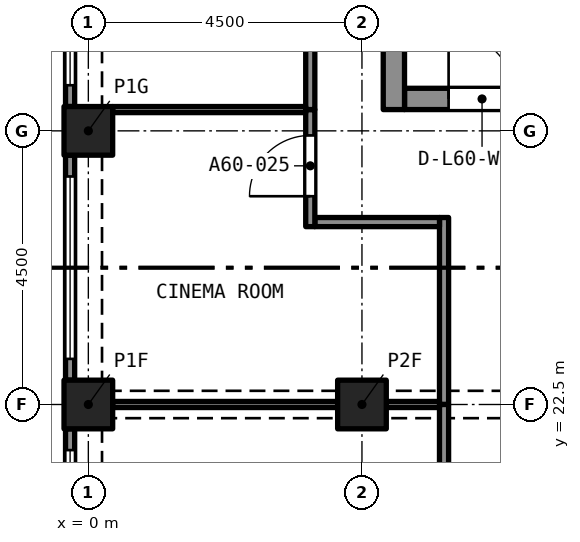
"""IFC4 building model, lengths in metres.
Left out: names, types, materials, properties, quantities, classifications, styles, units other than length and angle.
Written with IfcOpenShell. Run it as: python <this file> out.ifc"""

import sys

from ifc_helpers import new_model, si_unit, direction, frame, frame_2d, origin, origin_2d, place, context, subcontext, project, spatial, rectangle, extrude, element, fill, save


model = new_model("IFC4")
c1 = context("Model", 3, precision=1e-05, world=origin(), true_north=direction((0.0, 1.0)))
c2 = subcontext(c1, "Body", "Model", "MODEL_VIEW")
j1 = project(units=[si_unit("LENGTHUNIT", "METRE"), si_unit("PLANEANGLEUNIT", "RADIAN")], contexts=[c1])
p1 = place(None, origin())
s1 = spatial("IfcSite", under=j1, at=p1, CompositionType="ELEMENT")
p2 = place(p1, origin())
s2 = spatial("IfcBuilding", under=s1, at=p2, CompositionType="ELEMENT")
p3 = place(p2, frame((0.0, 0.0, 216.495)))
s3 = spatial("IfcBuildingStorey", under=s2, at=p3, CompositionType="ELEMENT", Elevation=216.495)
for number, where, z_axis, x_axis in (
    (1, (0.0, 22.5, 0.0), (0.0, 0.0, 1.0), (1.0, 0.0, 0.0)),
    (2, (4.5, 22.5, 0.0), (0.0, 0.0, 1.0), (1.0, 0.0, 0.0)),
    (3, (0.0, 27.0, 0.0), (0.0, 0.0, 1.0), (1.0, 0.0, 0.0)),
):
    element("IfcColumn", number, at=place(p3, frame(where, z_axis=z_axis, x_axis=x_axis)), inside=s3, PredefinedType="COLUMN", context=c2, shape_type="SweptSolid", body=[
        extrude(rectangle(XDim=0.8, YDim=0.8, at=origin_2d()), origin(), (0.0, 0.0, 1.0), 3.2),
    ])
p4 = place(p3, frame((5.2, 27.525, 0.0), z_axis=(0.0, 0.0, 1.0), x_axis=(1.0, 0.0, 0.0)))
e4 = element("IfcWall", 4, at=p4, inside=s3, PredefinedType="SOLIDWALL", context=c2, shape_type="SweptSolid", body=[
    extrude(rectangle(XDim=7.6, YDim=0.35, at=frame_2d((3.8, 0.0))), origin(), (0.0, 0.0, 1.0), 3.2),
])
p5 = place(p4, frame((0.725, 0.0, 0.0)))
e5 = element("IfcOpeningElement", 5, at=p5, cuts=e4, PredefinedType="OPENING", context=c2, shape_type="SweptSolid", body=[
    extrude(rectangle(XDim=1.1, YDim=2.1, at=frame_2d((0.55, 1.05))), frame((0.0, 0.185, 0.0), z_axis=(0.0, -1.0, 0.0), x_axis=(1.0, 0.0, 0.0)), (0.0, 0.0, 1.0), 0.37),
])
p6 = place(p4, frame((3.25, 0.0, 0.0)))
e6 = element("IfcOpeningElement", 6, at=p6, cuts=e4, PredefinedType="OPENING", context=c2, shape_type="SweptSolid", body=[
    extrude(rectangle(XDim=1.1, YDim=2.1, at=frame_2d((0.55, 1.05))), frame((0.0, 0.185, 0.0), z_axis=(0.0, -1.0, 0.0), x_axis=(1.0, 0.0, 0.0)), (0.0, 0.0, 1.0), 0.37),
])
p7 = place(p4, frame((5.775, 0.0, 0.0)))
e7 = element("IfcOpeningElement", 7, at=p7, cuts=e4, PredefinedType="OPENING", context=c2, shape_type="SweptSolid", body=[
    extrude(rectangle(XDim=1.1, YDim=2.1, at=frame_2d((0.55, 1.05))), frame((0.0, 0.185, 0.0), z_axis=(0.0, -1.0, 0.0), x_axis=(1.0, 0.0, 0.0)), (0.0, 0.0, 1.0), 0.37),
])
p8 = place(p3, frame((5.025, 27.35, 0.0), z_axis=(0.0, 0.0, 1.0), x_axis=(0.0, 1.0, 0.0)))
e8 = element("IfcWall", 8, at=p8, inside=s3, PredefinedType="SOLIDWALL", context=c2, shape_type="SweptSolid", body=[
    extrude(rectangle(XDim=12.8, YDim=0.35, at=frame_2d((6.4, 0.0))), origin(), (0.0, 0.0, 1.0), 3.2),
])
p9 = place(p8, frame((8.6, 0.0, 0.0)))
e9 = element("IfcOpeningElement", 9, at=p9, cuts=e8, PredefinedType="OPENING", context=c2, shape_type="SweptSolid", body=[
    extrude(rectangle(XDim=1.2, YDim=2.1, at=frame_2d((0.6, 1.05))), frame((0.0, 0.185, 0.0), z_axis=(0.0, -1.0, 0.0), x_axis=(1.0, 0.0, 0.0)), (0.0, 0.0, 1.0), 0.37),
])
p10 = place(p3, frame((-0.3, 27.4, 0.0), z_axis=(0.0, 0.0, 1.0), x_axis=(0.0, 1.0, 0.0)))
e10 = element("IfcWall", 10, at=p10, inside=s3, PredefinedType="SOLIDWALL", context=c2, shape_type="SweptSolid", body=[
    extrude(rectangle(XDim=3.7, YDim=0.15, at=frame_2d((1.85, 0.0))), origin(), (0.0, 0.0, 1.0), 3.2),
])
p11 = place(p10, frame((0.35, 0.0, 0.45)))
e11 = element("IfcOpeningElement", 11, at=p11, cuts=e10, PredefinedType="OPENING", context=c2, shape_type="SweptSolid", body=[
    extrude(rectangle(XDim=3.0, YDim=1.95, at=frame_2d((1.5, 0.975))), frame((0.0, 0.085, 0.0), z_axis=(0.0, -1.0, 0.0), x_axis=(1.0, 0.0, 0.0)), (0.0, 0.0, 1.0), 0.17),
])
p12 = place(p3, frame((-0.3, 22.9, 0.0), z_axis=(0.0, 0.0, 1.0), x_axis=(0.0, 1.0, 0.0)))
e12 = element("IfcWall", 12, at=p12, inside=s3, PredefinedType="SOLIDWALL", context=c2, shape_type="SweptSolid", body=[
    extrude(rectangle(XDim=3.7, YDim=0.15, at=frame_2d((1.85, 0.0))), origin(), (0.0, 0.0, 1.0), 3.2),
])
p13 = place(p12, frame((0.35, 0.0, 0.45)))
e13 = element("IfcOpeningElement", 13, at=p13, cuts=e12, PredefinedType="OPENING", context=c2, shape_type="SweptSolid", body=[
    extrude(rectangle(XDim=3.0, YDim=1.95, at=frame_2d((1.5, 0.975))), frame((0.0, 0.085, 0.0), z_axis=(0.0, -1.0, 0.0), x_axis=(1.0, 0.0, 0.0)), (0.0, 0.0, 1.0), 0.17),
])
p14 = place(p3, frame((-0.3, 18.4, 0.0), z_axis=(0.0, 0.0, 1.0), x_axis=(0.0, 1.0, 0.0)))
e14 = element("IfcWall", 14, at=p14, inside=s3, PredefinedType="SOLIDWALL", context=c2, shape_type="SweptSolid", body=[
    extrude(rectangle(XDim=3.7, YDim=0.15, at=frame_2d((1.85, 0.0))), origin(), (0.0, 0.0, 1.0), 3.2),
])
p15 = place(p14, frame((0.35, 0.0, 0.45)))
e15 = element("IfcOpeningElement", 15, at=p15, cuts=e14, PredefinedType="OPENING", context=c2, shape_type="SweptSolid", body=[
    extrude(rectangle(XDim=3.0, YDim=1.95, at=frame_2d((1.5, 0.975))), frame((0.0, 0.085, 0.0), z_axis=(0.0, -1.0, 0.0), x_axis=(1.0, 0.0, 0.0)), (0.0, 0.0, 1.0), 0.17),
])
p16 = place(p3, frame((5.85, 22.5, 0.0), z_axis=(0.0, 0.0, 1.0), x_axis=(0.0, 1.0, 0.0)))
e16 = element("IfcWall", 16, at=p16, inside=s3, PredefinedType="PARTITIONING", context=c2, shape_type="SweptSolid", body=[
    extrude(rectangle(XDim=3.075, YDim=0.15, at=frame_2d((1.538, 0.0))), origin(), (0.0, 0.0, 1.0), 2.9),
])
p17 = place(p3, frame((3.725, 25.5, 0.0), z_axis=(0.0, 0.0, 1.0), x_axis=(1.0, 0.0, 0.0)))
e17 = element("IfcWall", 17, at=p17, inside=s3, PredefinedType="PARTITIONING", context=c2, shape_type="SweptSolid", body=[
    extrude(rectangle(XDim=2.05, YDim=0.15, at=frame_2d((1.025, 0.0))), origin(), (0.0, 0.0, 1.0), 2.9),
])
p18 = place(p3, frame((3.65, 25.425, 0.0), z_axis=(0.0, 0.0, 1.0), x_axis=(0.0, 1.0, 0.0)))
e18 = element("IfcWall", 18, at=p18, inside=s3, PredefinedType="PARTITIONING", context=c2, shape_type="SweptSolid", body=[
    extrude(rectangle(XDim=1.925, YDim=0.15, at=frame_2d((0.962, 0.0))), origin(), (0.0, 0.0, 1.0), 2.9),
])
p19 = place(p18, frame((0.5, 0.0, 0.0)))
e19 = element("IfcOpeningElement", 19, at=p19, cuts=e18, PredefinedType="OPENING", context=c2, shape_type="SweptSolid", body=[
    extrude(rectangle(XDim=1.0, YDim=2.1, at=frame_2d((0.5, 1.05))), frame((0.0, 0.085, 0.0), z_axis=(0.0, -1.0, 0.0), x_axis=(1.0, 0.0, 0.0)), (0.0, 0.0, 1.0), 0.17),
])
p20 = place(p3, frame((3.65, 27.35, 0.0), z_axis=(0.0, 0.0, 1.0), x_axis=(0.0, 1.0, 0.0)))
e20 = element("IfcWall", 20, at=p20, inside=s3, PredefinedType="PARTITIONING", context=c2, shape_type="SweptSolid", body=[
    extrude(rectangle(XDim=4.15, YDim=0.15, at=frame_2d((2.075, 0.0))), origin(), (0.0, 0.0, 1.0), 2.9),
])
p21 = place(p20, frame((1.575, 0.0, 0.0)))
e21 = element("IfcOpeningElement", 21, at=p21, cuts=e20, PredefinedType="OPENING", context=c2, shape_type="SweptSolid", body=[
    extrude(rectangle(XDim=1.0, YDim=2.1, at=frame_2d((0.5, 1.05))), frame((0.0, 0.085, 0.0), z_axis=(0.0, -1.0, 0.0), x_axis=(1.0, 0.0, 0.0)), (0.0, 0.0, 1.0), 0.17),
])
p22 = place(p3, frame((5.85, 13.025, 0.0), z_axis=(0.0, 0.0, 1.0), x_axis=(0.0, 1.0, 0.0)))
e22 = element("IfcWall", 22, at=p22, inside=s3, PredefinedType="PARTITIONING", context=c2, shape_type="SweptSolid", body=[
    extrude(rectangle(XDim=9.475, YDim=0.15, at=frame_2d((4.738, 0.0))), origin(), (0.0, 0.0, 1.0), 2.9),
])
p23 = place(p22, frame((4.275, 0.0, 0.0)))
e23 = element("IfcOpeningElement", 23, at=p23, cuts=e22, PredefinedType="OPENING", context=c2, shape_type="SweptSolid", body=[
    extrude(rectangle(XDim=1.0, YDim=2.1, at=frame_2d((0.5, 1.05))), frame((0.0, 0.085, 0.0), z_axis=(0.0, -1.0, 0.0), x_axis=(1.0, 0.0, 0.0)), (0.0, 0.0, 1.0), 0.17),
])
p24 = place(p3, frame((0.4, 27.35, 0.0), z_axis=(0.0, 0.0, 1.0), x_axis=(1.0, 0.0, 0.0)))
e24 = element("IfcWall", 24, at=p24, inside=s3, PredefinedType="PARTITIONING", context=c2, shape_type="SweptSolid", body=[
    extrude(rectangle(XDim=3.175, YDim=0.1, at=frame_2d((1.587, 0.0))), origin(), (0.0, 0.0, 1.0), 2.9),
])
p25 = place(p3, frame((4.9, 22.5, 0.0), z_axis=(0.0, 0.0, 1.0), x_axis=(1.0, 0.0, 0.0)))
e25 = element("IfcWall", 25, at=p25, inside=s3, PredefinedType="PARTITIONING", context=c2, shape_type="SweptSolid", body=[
    extrude(rectangle(XDim=0.875, YDim=0.1, at=frame_2d((0.438, 0.0))), origin(), (0.0, 0.0, 1.0), 2.38),
])
p26 = place(p3, frame((0.4, 22.5, 0.0), z_axis=(0.0, 0.0, 1.0), x_axis=(1.0, 0.0, 0.0)))
e26 = element("IfcWall", 26, at=p26, inside=s3, PredefinedType="PARTITIONING", context=c2, shape_type="SweptSolid", body=[
    extrude(rectangle(XDim=3.7, YDim=0.1, at=frame_2d((1.85, 0.0))), origin(), (0.0, 0.0, 1.0), 2.38),
])
p27 = place(p11, origin())
e27 = element("IfcWindow", 27, at=p27, inside=s3, PartitioningType="SINGLE_PANEL", PredefinedType="WINDOW", context=c2, shape_type="SweptSolid", body=[
    extrude(rectangle(XDim=3.0, YDim=1.95, at=frame_2d((1.5, 0.975))), frame((0.0, 0.03, 0.0), z_axis=(0.0, -1.0, 0.0), x_axis=(1.0, 0.0, 0.0)), (0.0, 0.0, 1.0), 0.06),
])
fill(e11, e27)
p28 = place(p13, origin())
e28 = element("IfcWindow", 28, at=p28, inside=s3, PartitioningType="SINGLE_PANEL", PredefinedType="WINDOW", context=c2, shape_type="SweptSolid", body=[
    extrude(rectangle(XDim=3.0, YDim=1.95, at=frame_2d((1.5, 0.975))), frame((0.0, 0.03, 0.0), z_axis=(0.0, -1.0, 0.0), x_axis=(1.0, 0.0, 0.0)), (0.0, 0.0, 1.0), 0.06),
])
fill(e13, e28)
p29 = place(p15, origin())
e29 = element("IfcWindow", 29, at=p29, inside=s3, PartitioningType="SINGLE_PANEL", PredefinedType="WINDOW", context=c2, shape_type="SweptSolid", body=[
    extrude(rectangle(XDim=3.0, YDim=1.95, at=frame_2d((1.5, 0.975))), frame((0.0, 0.03, 0.0), z_axis=(0.0, -1.0, 0.0), x_axis=(1.0, 0.0, 0.0)), (0.0, 0.0, 1.0), 0.06),
])
fill(e15, e29)
p30 = place(p19, origin())
e30 = element("IfcDoor", 30, at=p30, inside=s3, OperationType="SINGLE_SWING_RIGHT", PredefinedType="DOOR", context=c2, shape_type="SweptSolid", body=[
    extrude(rectangle(XDim=1.0, YDim=2.1, at=frame_2d((0.5, 1.05))), frame((0.0, 0.025, 0.0), z_axis=(0.0, -1.0, 0.0), x_axis=(1.0, 0.0, 0.0)), (0.0, 0.0, 1.0), 0.05),
])
fill(e19, e30)
p31 = place(p5, origin())
e31 = element("IfcDoor", 31, at=p31, inside=s3, OperationType="SINGLE_SWING_LEFT", PredefinedType="DOOR", context=c2, shape_type="SweptSolid", body=[
    extrude(rectangle(XDim=1.1, YDim=2.1, at=frame_2d((0.55, 1.05))), frame((0.0, 0.025, 0.0), z_axis=(0.0, -1.0, 0.0), x_axis=(1.0, 0.0, 0.0)), (0.0, 0.0, 1.0), 0.05),
])
fill(e5, e31)
save(model, sys.argv[1])
